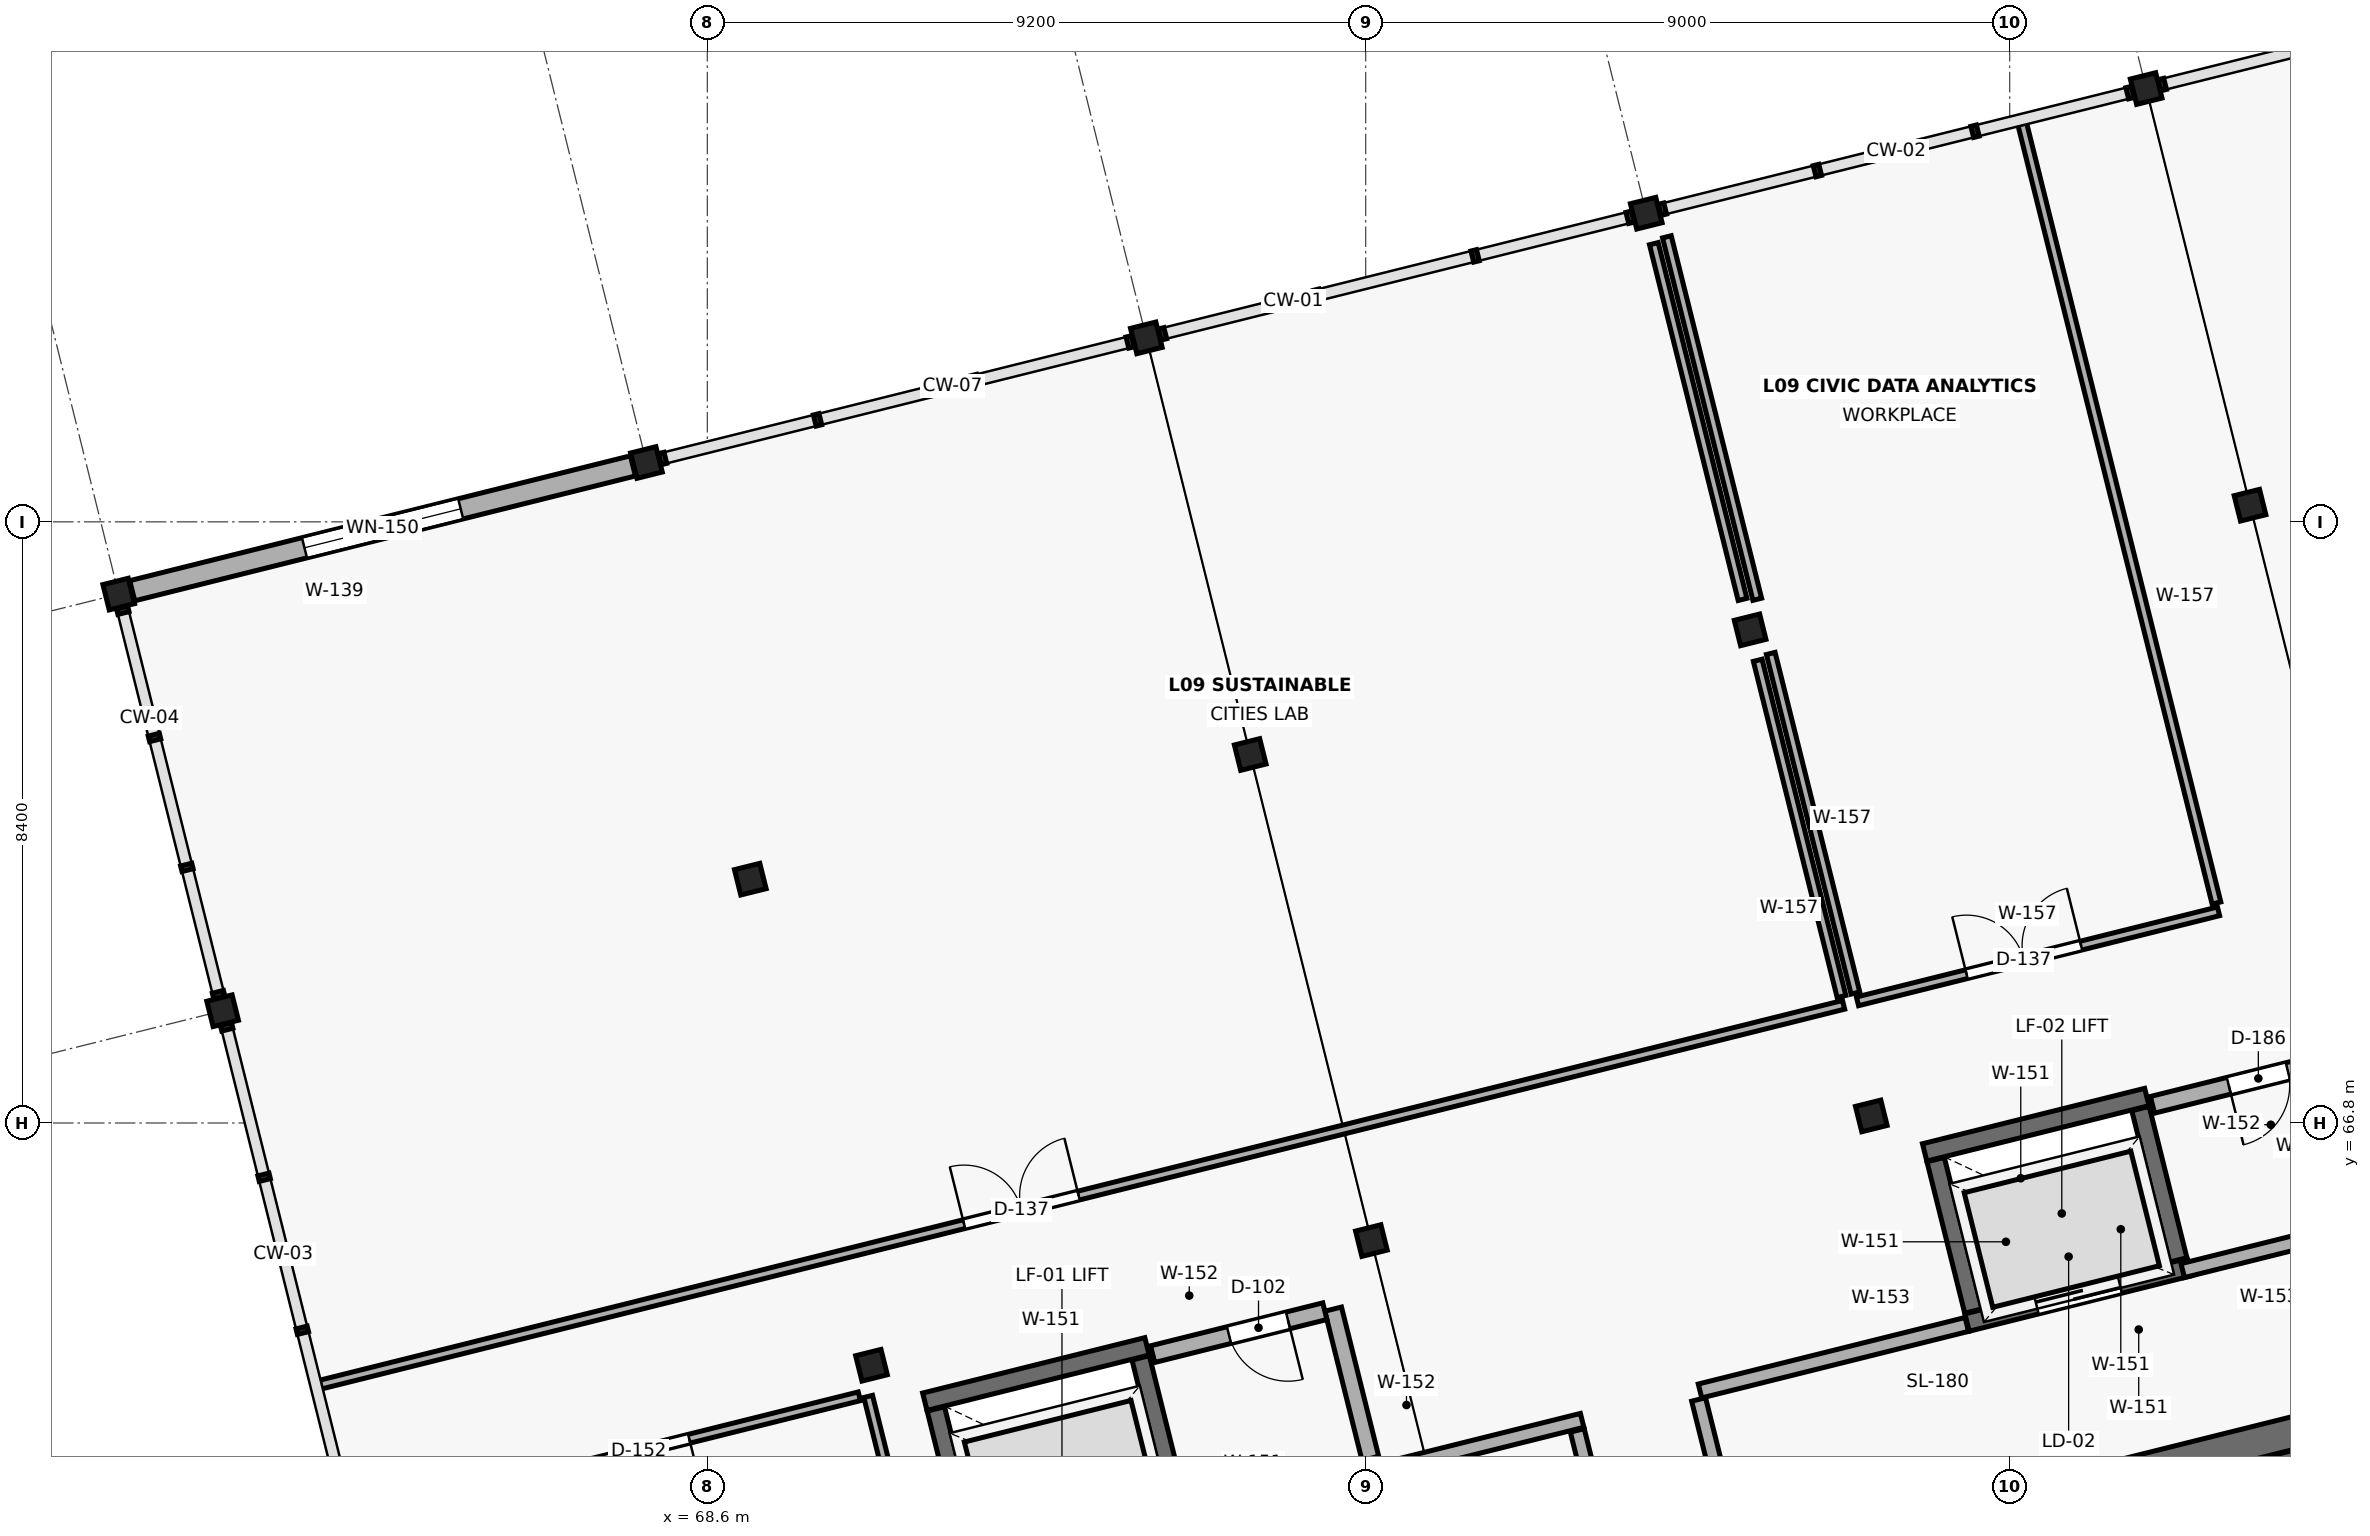
"""IFC4 building model, lengths in metres.
Left out: names, types, materials, properties, quantities, classifications, styles, units other than length and angle.
Written with IfcOpenShell. Run it as: python <this file> out.ifc"""

import sys

from ifc_helpers import new_model, si_unit, direction, frame, frame_2d, origin, origin_2d, place, context, subcontext, project, spatial, rectangle, extrude, element, fill, save


model = new_model("IFC4")
c1 = context("Model", 3, precision=1e-05, world=origin(), true_north=direction((0.0, 1.0)))
c2 = subcontext(c1, "Body", "Model", "MODEL_VIEW")
j1 = project(units=[si_unit("LENGTHUNIT", "METRE"), si_unit("PLANEANGLEUNIT", "RADIAN")], contexts=[c1])
p1 = place(None, origin())
s1 = spatial("IfcSite", under=j1, at=p1, CompositionType="ELEMENT")
p2 = place(p1, origin())
s2 = spatial("IfcBuilding", under=s1, at=p2, CompositionType="ELEMENT")
p3 = place(p2, frame((0.0, 0.0, 37.8)))
s3 = spatial("IfcBuildingStorey", under=s2, at=p3, CompositionType="ELEMENT", Elevation=37.8)
for number, where, z_axis, x_axis in (
    (1, (61.826, 68.368, 0.0), (0.0, 0.0, 1.0), (0.97, 0.242, 0.0)),
    (2, (60.375, 74.19, 0.0), (0.0, 0.0, 1.0), (0.97, 0.242, 0.0)),
    (3, (70.894, 63.415, 0.0), (0.0, 0.0, 1.0), (0.97, 0.242, 0.0)),
    (4, (69.2, 70.207, 0.0), (0.0, 0.0, 1.0), (0.97, 0.242, 0.0)),
    (5, (67.749, 76.029, 0.0), (0.0, 0.0, 1.0), (0.97, 0.242, 0.0)),
    (6, (77.88, 65.157, 0.0), (0.0, 0.0, 1.0), (0.97, 0.242, 0.0)),
    (7, (76.187, 71.949, 0.0), (0.0, 0.0, 1.0), (0.97, 0.242, 0.0)),
    (8, (74.735, 77.771, 0.0), (0.0, 0.0, 1.0), (0.97, 0.242, 0.0)),
    (9, (84.866, 66.898, 0.0), (0.0, 0.0, 1.0), (0.97, 0.242, 0.0)),
    (10, (83.173, 73.691, 0.0), (0.0, 0.0, 1.0), (0.97, 0.242, 0.0)),
    (11, (81.721, 79.512, 0.0), (0.0, 0.0, 1.0), (0.97, 0.242, 0.0)),
    (12, (90.159, 75.432, 0.0), (0.0, 0.0, 1.0), (0.97, 0.242, 0.0)),
    (13, (88.707, 81.254, 0.0), (0.0, 0.0, 1.0), (0.97, 0.242, 0.0)),
):
    element("IfcColumn", number, at=place(p3, frame(where, z_axis=z_axis, x_axis=x_axis)), inside=s3, PredefinedType="COLUMN", context=c2, shape_type="SweptSolid", body=[
        extrude(rectangle(XDim=0.365, YDim=0.365, at=origin_2d()), origin(), (0.0, 0.0, 1.0), 3.9),
    ])
p4 = place(p3, frame((60.563, 74.237, 0.0), z_axis=(0.0, 0.0, 1.0), x_axis=(0.970291682811, 0.241938112473, 0.0)))
e14 = element("IfcWall", 14, at=p4, inside=s3, PredefinedType="SOLIDWALL", context=c2, shape_type="SweptSolid", body=[
    extrude(rectangle(XDim=7.211, YDim=0.29, at=frame_2d((3.605, 0.0))), origin(), (0.0, 0.0, 1.0), 2.79),
])
p5 = place(p4, frame((2.48, 0.0, 0.8)))
e15 = element("IfcOpeningElement", 15, at=p5, cuts=e14, PredefinedType="OPENING", context=c2, shape_type="SweptSolid", body=[
    extrude(rectangle(XDim=2.25, YDim=1.95, at=frame_2d((1.125, 0.975))), frame((0.0, 0.157, 0.0), z_axis=(0.0, -1.0, 0.0), x_axis=(1.0, 0.0, 0.0)), (0.0, 0.0, 1.0), 0.314),
])
p6 = place(p3, frame((90.812, 62.48, 0.0), z_axis=(0.0, 0.0, 1.0), x_axis=(-0.970309259708, -0.2418676095, 0.0)))
e16 = element("IfcWall", 16, at=p6, inside=s3, PredefinedType="SHEAR", context=c2, shape_type="SweptSolid", body=[
    extrude(rectangle(XDim=4.3, YDim=0.45, at=frame_2d((2.15, 0.0))), origin(), (0.0, 0.0, 1.0), 3.72),
])
p7 = place(p3, frame((92.436, 55.037, 0.0), z_axis=(0.0, 0.0, 1.0), x_axis=(-0.241920660665, 0.970296034179, 0.0)))
e17 = element("IfcWall", 17, at=p7, inside=s3, PredefinedType="SHEAR", context=c2, shape_type="SweptSolid", body=[
    extrude(rectangle(XDim=7.38, YDim=0.45, at=frame_2d((3.69, 0.0))), origin(), (0.0, 0.0, 1.0), 3.72),
])
p8 = place(p3, frame((74.744, 63.679, 0.0), z_axis=(0.0, 0.0, 1.0), x_axis=(-0.970294894235, -0.241925232711, 0.0)))
e18 = element("IfcWall", 18, at=p8, inside=s3, PredefinedType="SHEAR", context=c2, shape_type="SweptSolid", body=[
    extrude(rectangle(XDim=3.2, YDim=0.25, at=frame_2d((1.6, 0.0))), origin(), (0.0, 0.0, 1.0), 3.72),
])
for number, where, z_axis, x_axis in (
    (19, (71.793, 62.804, 0.0), (0.0, 0.0, 1.0), (0.242, -0.97, 0.0)),
    (20, (75.183, 61.403, 0.0), (0.0, 0.0, 1.0), (-0.242, 0.97, 0.0)),
):
    element("IfcWall", number, at=place(p3, frame(where, z_axis=z_axis, x_axis=x_axis)), inside=s3, PredefinedType="SHEAR", context=c2, shape_type="SweptSolid", body=[
        extrude(rectangle(XDim=2.18, YDim=0.25, at=frame_2d((1.09, 0.0))), origin(), (0.0, 0.0, 1.0), 3.72),
    ])
p9 = place(p3, frame((88.717, 67.163, 0.0), z_axis=(0.0, 0.0, 1.0), x_axis=(-0.970294894235, -0.241925232711, 0.0)))
e21 = element("IfcWall", 21, at=p9, inside=s3, PredefinedType="SHEAR", context=c2, shape_type="SweptSolid", body=[
    extrude(rectangle(XDim=3.2, YDim=0.25, at=frame_2d((1.6, 0.0))), origin(), (0.0, 0.0, 1.0), 3.72),
])
for number, where, z_axis, x_axis in (
    (22, (85.766, 66.288, 0.0), (0.0, 0.0, 1.0), (0.242, -0.97, 0.0)),
    (23, (89.155, 64.886, 0.0), (0.0, 0.0, 1.0), (-0.242, 0.97, 0.0)),
):
    element("IfcWall", number, at=place(p3, frame(where, z_axis=z_axis, x_axis=x_axis)), inside=s3, PredefinedType="SHEAR", context=c2, shape_type="SweptSolid", body=[
        extrude(rectangle(XDim=2.18, YDim=0.25, at=frame_2d((1.09, 0.0))), origin(), (0.0, 0.0, 1.0), 3.72),
    ])
p10 = place(p3, frame((86.204, 64.011, 0.0), z_axis=(0.0, 0.0, 1.0), x_axis=(0.970294894235, 0.241925232711, 0.0)))
e24 = element("IfcWall", 24, at=p10, inside=s3, PredefinedType="SHEAR", context=c2, shape_type="SweptSolid", body=[
    extrude(rectangle(XDim=3.2, YDim=0.25, at=frame_2d((1.6, 0.0))), origin(), (0.0, 0.0, 1.0), 3.72),
])
p11 = place(p10, frame((1.0, 0.0, 0.0)))
e25 = element("IfcOpeningElement", 25, at=p11, cuts=e24, PredefinedType="OPENING", context=c2, shape_type="SweptSolid", body=[
    extrude(rectangle(XDim=1.2, YDim=2.2, at=frame_2d((0.6, 1.1))), frame((0.0, 0.137, 0.0), z_axis=(0.0, -1.0, 0.0), x_axis=(1.0, 0.0, 0.0)), (0.0, 0.0, 1.0), 0.274),
])
p12 = place(p3, frame((75.246, 61.253, 0.0), z_axis=(0.0, 0.0, 1.0), x_axis=(0.970292173201, 0.24193614576, 0.0)))
e26 = element("IfcWall", 26, at=p12, inside=s3, PredefinedType="STANDARD", context=c2, shape_type="SweptSolid", body=[
    extrude(rectangle(XDim=5.75, YDim=0.2, at=frame_2d((2.875, 0.0))), origin(), (0.0, 0.0, 1.0), 3.72),
])
p13 = place(p3, frame((80.757, 62.504, 0.0), z_axis=(0.0, 0.0, 1.0), x_axis=(0.241885902723, -0.970304699599, 0.0)))
e27 = element("IfcWall", 27, at=p13, inside=s3, PredefinedType="STANDARD", context=c2, shape_type="SweptSolid", body=[
    extrude(rectangle(XDim=3.36, YDim=0.2, at=frame_2d((1.68, 0.0))), origin(), (0.0, 0.0, 1.0), 3.72),
])
p14 = place(p13, frame((0.89, 0.0, 0.0)))
e28 = element("IfcOpeningElement", 28, at=p14, cuts=e27, PredefinedType="OPENING", context=c2, shape_type="SweptSolid", body=[
    extrude(rectangle(XDim=1.1, YDim=2.2, at=frame_2d((0.55, 1.1))), frame((0.0, 0.112, 0.0), z_axis=(0.0, -1.0, 0.0), x_axis=(1.0, 0.0, 0.0)), (0.0, 0.0, 1.0), 0.224),
])
p15 = place(p3, frame((82.453, 62.937, 0.0), z_axis=(0.0, 0.0, 1.0), x_axis=(0.241891967324, -0.970303187743, 0.0)))
e29 = element("IfcWall", 29, at=p15, inside=s3, PredefinedType="STANDARD", context=c2, shape_type="SweptSolid", body=[
    extrude(rectangle(XDim=5.98, YDim=0.2, at=frame_2d((2.99, 0.0))), origin(), (0.0, 0.0, 1.0), 3.72),
])
p16 = place(p3, frame((82.473, 63.055, 0.0), z_axis=(0.0, 0.0, 1.0), x_axis=(0.970284368558, 0.241967444366, 0.0)))
e30 = element("IfcWall", 30, at=p16, inside=s3, PredefinedType="STANDARD", context=c2, shape_type="SweptSolid", body=[
    extrude(rectangle(XDim=3.842, YDim=0.2, at=frame_2d((1.921, 0.0))), origin(), (0.0, 0.0, 1.0), 3.72),
])
p17 = place(p3, frame((89.218, 64.737, 0.0), z_axis=(0.0, 0.0, 1.0), x_axis=(0.97027839681, 0.241991389687, 0.0)))
e31 = element("IfcWall", 31, at=p17, inside=s3, PredefinedType="STANDARD", context=c2, shape_type="SweptSolid", body=[
    extrude(rectangle(XDim=2.85, YDim=0.2, at=frame_2d((1.425, 0.0))), origin(), (0.0, 0.0, 1.0), 3.72),
])
p18 = place(p3, frame((77.866, 62.113, 0.0), z_axis=(0.0, 0.0, 1.0), x_axis=(-0.2418676095, 0.970309259708, 0.0)))
e32 = element("IfcWall", 32, at=p18, inside=s3, PredefinedType="STANDARD", context=c2, shape_type="SweptSolid", body=[
    extrude(rectangle(XDim=2.15, YDim=0.24, at=frame_2d((1.075, 0.0))), origin(), (0.0, 0.0, 1.0), 3.72),
])
p19 = place(p3, frame((77.229, 64.17, 0.0), z_axis=(0.0, 0.0, 1.0), x_axis=(-0.970310192441, -0.241863867589, 0.0)))
e33 = element("IfcWall", 33, at=p19, inside=s3, PredefinedType="STANDARD", context=c2, shape_type="SweptSolid", body=[
    extrude(rectangle(XDim=2.48, YDim=0.24, at=frame_2d((1.24, 0.0))), origin(), (0.0, 0.0, 1.0), 3.72),
])
p20 = place(p19, frame((0.53, 0.0, 0.0)))
e34 = element("IfcOpeningElement", 34, at=p20, cuts=e33, PredefinedType="OPENING", context=c2, shape_type="SweptSolid", body=[
    extrude(rectangle(XDim=0.85, YDim=2.1, at=frame_2d((0.425, 1.05))), frame((0.0, 0.132, 0.0), z_axis=(0.0, -1.0, 0.0), x_axis=(1.0, 0.0, 0.0)), (0.0, 0.0, 1.0), 0.264),
])
p21 = place(p3, frame((91.202, 67.654, 0.0), z_axis=(0.0, 0.0, 1.0), x_axis=(-0.970304433136, -0.241886971613, 0.0)))
e35 = element("IfcWall", 35, at=p21, inside=s3, PredefinedType="STANDARD", context=c2, shape_type="SweptSolid", body=[
    extrude(rectangle(XDim=2.48, YDim=0.24, at=frame_2d((1.24, 0.0))), origin(), (0.0, 0.0, 1.0), 3.72),
])
p22 = place(p21, frame((0.53, 0.0, 0.0)))
e36 = element("IfcOpeningElement", 36, at=p22, cuts=e35, PredefinedType="OPENING", context=c2, shape_type="SweptSolid", body=[
    extrude(rectangle(XDim=0.85, YDim=2.1, at=frame_2d((0.425, 1.05))), frame((0.0, 0.132, 0.0), z_axis=(0.0, -1.0, 0.0), x_axis=(1.0, 0.0, 0.0)), (0.0, 0.0, 1.0), 0.264),
])
p23 = place(p3, frame((72.39, 56.794, 0.0), z_axis=(0.0, 0.0, 1.0), x_axis=(-0.241922822951, 0.970295495061, 0.0)))
e37 = element("IfcWall", 37, at=p23, inside=s3, PredefinedType="PARTITIONING", context=c2, shape_type="SweptSolid", body=[
    extrude(rectangle(XDim=6.375, YDim=0.125, at=frame_2d((3.188, 0.0))), origin(), (0.0, 0.0, 1.0), 3.035),
])
p24 = place(p3, frame((70.724, 62.981, 0.0), z_axis=(0.0, 0.0, 1.0), x_axis=(-0.970293813542, -0.241929567029, 0.0)))
e38 = element("IfcWall", 38, at=p24, inside=s3, PredefinedType="PARTITIONING", context=c2, shape_type="SweptSolid", body=[
    extrude(rectangle(XDim=7.109, YDim=0.125, at=frame_2d((3.555, 0.0))), origin(), (0.0, 0.0, 1.0), 3.72),
])
p25 = place(p24, frame((2.45, 0.0, 0.0)))
e39 = element("IfcOpeningElement", 39, at=p25, cuts=e38, PredefinedType="OPENING", context=c2, shape_type="SweptSolid", body=[
    extrude(rectangle(XDim=1.45, YDim=2.35, at=frame_2d((0.725, 1.175))), frame((0.0, 0.074, 0.0), z_axis=(0.0, -1.0, 0.0), x_axis=(1.0, 0.0, 0.0)), (0.0, 0.0, 1.0), 0.149),
])
p26 = place(p3, frame((63.191, 63.143, 0.0), z_axis=(0.0, 0.0, 1.0), x_axis=(0.970297434182, 0.241915045462, 0.0)))
e40 = element("IfcWall", 40, at=p26, inside=s3, PredefinedType="PARTITIONING", context=c2, shape_type="SweptSolid", body=[
    extrude(rectangle(XDim=21.94, YDim=0.125, at=frame_2d((10.97, 0.0))), origin(), (0.0, 0.0, 1.0), 3.72),
])
p27 = place(p26, frame((9.273, 0.0, 0.0)))
e41 = element("IfcOpeningElement", 41, at=p27, cuts=e40, PredefinedType="OPENING", context=c2, shape_type="SweptSolid", body=[
    extrude(rectangle(XDim=1.65, YDim=2.35, at=frame_2d((0.825, 1.175))), frame((0.0, 0.074, 0.0), z_axis=(0.0, -1.0, 0.0), x_axis=(1.0, 0.0, 0.0)), (0.0, 0.0, 1.0), 0.149),
])
p28 = place(p3, frame((84.45, 68.567, 0.0), z_axis=(0.0, 0.0, 1.0), x_axis=(-0.241894861771, 0.970302466166, 0.0)))
e42 = element("IfcWall", 42, at=p28, inside=s3, PredefinedType="PARTITIONING", context=c2, shape_type="SweptSolid", body=[
    extrude(rectangle(XDim=4.842, YDim=0.125, at=frame_2d((2.421, 0.0))), origin(), (0.0, 0.0, 1.0), 3.035),
])
p29 = place(p3, frame((83.067, 74.116, 0.0), z_axis=(0.0, 0.0, 1.0), x_axis=(-0.241941301347, 0.970290887674, 0.0)))
e43 = element("IfcWall", 43, at=p29, inside=s3, PredefinedType="PARTITIONING", context=c2, shape_type="SweptSolid", body=[
    extrude(rectangle(XDim=5.123, YDim=0.125, at=frame_2d((2.562, 0.0))), origin(), (0.0, 0.0, 1.0), 3.035),
])
p30 = place(p3, frame((84.673, 68.499, 0.0), z_axis=(0.0, 0.0, 1.0), x_axis=(0.970294203593, 0.241928002667, 0.0)))
e44 = element("IfcWall", 44, at=p30, inside=s3, PredefinedType="PARTITIONING", context=c2, shape_type="SweptSolid", body=[
    extrude(rectangle(XDim=5.2, YDim=0.125, at=frame_2d((2.6, 0.0))), origin(), (0.0, 0.0, 1.0), 3.72),
])
p31 = place(p30, frame((1.571, 0.0, 0.0)))
e45 = element("IfcOpeningElement", 45, at=p31, cuts=e44, PredefinedType="OPENING", context=c2, shape_type="SweptSolid", body=[
    extrude(rectangle(XDim=1.65, YDim=2.35, at=frame_2d((0.825, 1.175))), frame((0.0, 0.074, 0.0), z_axis=(0.0, -1.0, 0.0), x_axis=(1.0, 0.0, 0.0)), (0.0, 0.0, 1.0), 0.149),
])
p32 = place(p3, frame((89.69, 69.874, 0.0), z_axis=(0.0, 0.0, 1.0), x_axis=(-0.241921192876, 0.970295901485, 0.0)))
e46 = element("IfcWall", 46, at=p32, inside=s3, PredefinedType="PARTITIONING", context=c2, shape_type="SweptSolid", body=[
    extrude(rectangle(XDim=11.22, YDim=0.125, at=frame_2d((5.61, 0.0))), origin(), (0.0, 0.0, 1.0), 3.72),
])
p33 = place(p3, frame((82.01, 79.183, 0.0), z_axis=(0.0, 0.0, 1.0), x_axis=(0.241908270235, -0.970299123359, 0.0)))
e47 = element("IfcWall", 47, at=p33, inside=s3, PredefinedType="PARTITIONING", context=c2, shape_type="SweptSolid", body=[
    extrude(rectangle(XDim=5.22, YDim=0.125, at=frame_2d((2.61, 0.0))), origin(), (0.0, 0.0, 1.0), 3.72),
])
p34 = place(p3, frame((83.461, 73.361, 0.0), z_axis=(0.0, 0.0, 1.0), x_axis=(0.241924759673, -0.970295012178, 0.0)))
e48 = element("IfcWall", 48, at=p34, inside=s3, PredefinedType="PARTITIONING", context=c2, shape_type="SweptSolid", body=[
    extrude(rectangle(XDim=4.89, YDim=0.125, at=frame_2d((2.445, 0.0))), origin(), (0.0, 0.0, 1.0), 3.72),
])
p35 = place(p5, origin())
e49 = element("IfcWindow", 49, at=p35, inside=s3, PartitioningType="SINGLE_PANEL", PredefinedType="WINDOW", context=c2, shape_type="SweptSolid", body=[
    extrude(rectangle(XDim=2.25, YDim=1.95, at=frame_2d((1.125, 0.975))), frame((0.0, 0.03, 0.0), z_axis=(0.0, -1.0, 0.0), x_axis=(1.0, 0.0, 0.0)), (0.0, 0.0, 1.0), 0.06),
])
fill(e15, e49)
p36 = place(p11, origin())
e50 = element("IfcDoor", 50, at=p36, inside=s3, OperationType="DOUBLE_DOOR_SLIDING", PredefinedType="DOOR", context=c2, shape_type="SweptSolid", body=[
    extrude(rectangle(XDim=1.2, YDim=2.2, at=frame_2d((0.6, 1.1))), frame((0.0, 0.025, 0.0), z_axis=(0.0, -1.0, 0.0), x_axis=(1.0, 0.0, 0.0)), (0.0, 0.0, 1.0), 0.05),
])
fill(e25, e50)
p37 = place(p20, origin())
e51 = element("IfcDoor", 51, at=p37, inside=s3, OperationType="SINGLE_SWING_LEFT", PredefinedType="DOOR", context=c2, shape_type="SweptSolid", body=[
    extrude(rectangle(XDim=0.85, YDim=2.1, at=frame_2d((0.425, 1.05))), frame((0.0, 0.025, 0.0), z_axis=(0.0, -1.0, 0.0), x_axis=(1.0, 0.0, 0.0)), (0.0, 0.0, 1.0), 0.05),
])
fill(e34, e51)
p38 = place(p22, origin())
e52 = element("IfcDoor", 52, at=p38, inside=s3, OperationType="SINGLE_SWING_RIGHT", PredefinedType="DOOR", context=c2, shape_type="SweptSolid", body=[
    extrude(rectangle(XDim=0.85, YDim=2.1, at=frame_2d((0.425, 1.05))), frame((0.0, 0.025, 0.0), z_axis=(0.0, -1.0, 0.0), x_axis=(1.0, 0.0, 0.0)), (0.0, 0.0, 1.0), 0.05),
])
fill(e36, e52)
p39 = place(p25, origin())
e53 = element("IfcDoor", 53, at=p39, inside=s3, OperationType="DOUBLE_DOOR_SINGLE_SWING", PredefinedType="DOOR", context=c2, shape_type="SweptSolid", body=[
    extrude(rectangle(XDim=1.45, YDim=2.35, at=frame_2d((0.725, 1.175))), frame((0.0, 0.025, 0.0), z_axis=(0.0, -1.0, 0.0), x_axis=(1.0, 0.0, 0.0)), (0.0, 0.0, 1.0), 0.05),
])
fill(e39, e53)
p40 = place(p27, origin())
e54 = element("IfcDoor", 54, at=p40, inside=s3, OperationType="DOUBLE_DOOR_SINGLE_SWING", PredefinedType="DOOR", context=c2, shape_type="SweptSolid", body=[
    extrude(rectangle(XDim=1.65, YDim=2.35, at=frame_2d((0.825, 1.175))), frame((0.0, 0.025, 0.0), z_axis=(0.0, -1.0, 0.0), x_axis=(1.0, 0.0, 0.0)), (0.0, 0.0, 1.0), 0.05),
])
fill(e41, e54)
p41 = place(p31, origin())
e55 = element("IfcDoor", 55, at=p41, inside=s3, OperationType="DOUBLE_DOOR_SINGLE_SWING", PredefinedType="DOOR", context=c2, shape_type="SweptSolid", body=[
    extrude(rectangle(XDim=1.65, YDim=2.35, at=frame_2d((0.825, 1.175))), frame((0.0, 0.025, 0.0), z_axis=(0.0, -1.0, 0.0), x_axis=(1.0, 0.0, 0.0)), (0.0, 0.0, 1.0), 0.05),
])
fill(e45, e55)
save(model, sys.argv[1])
